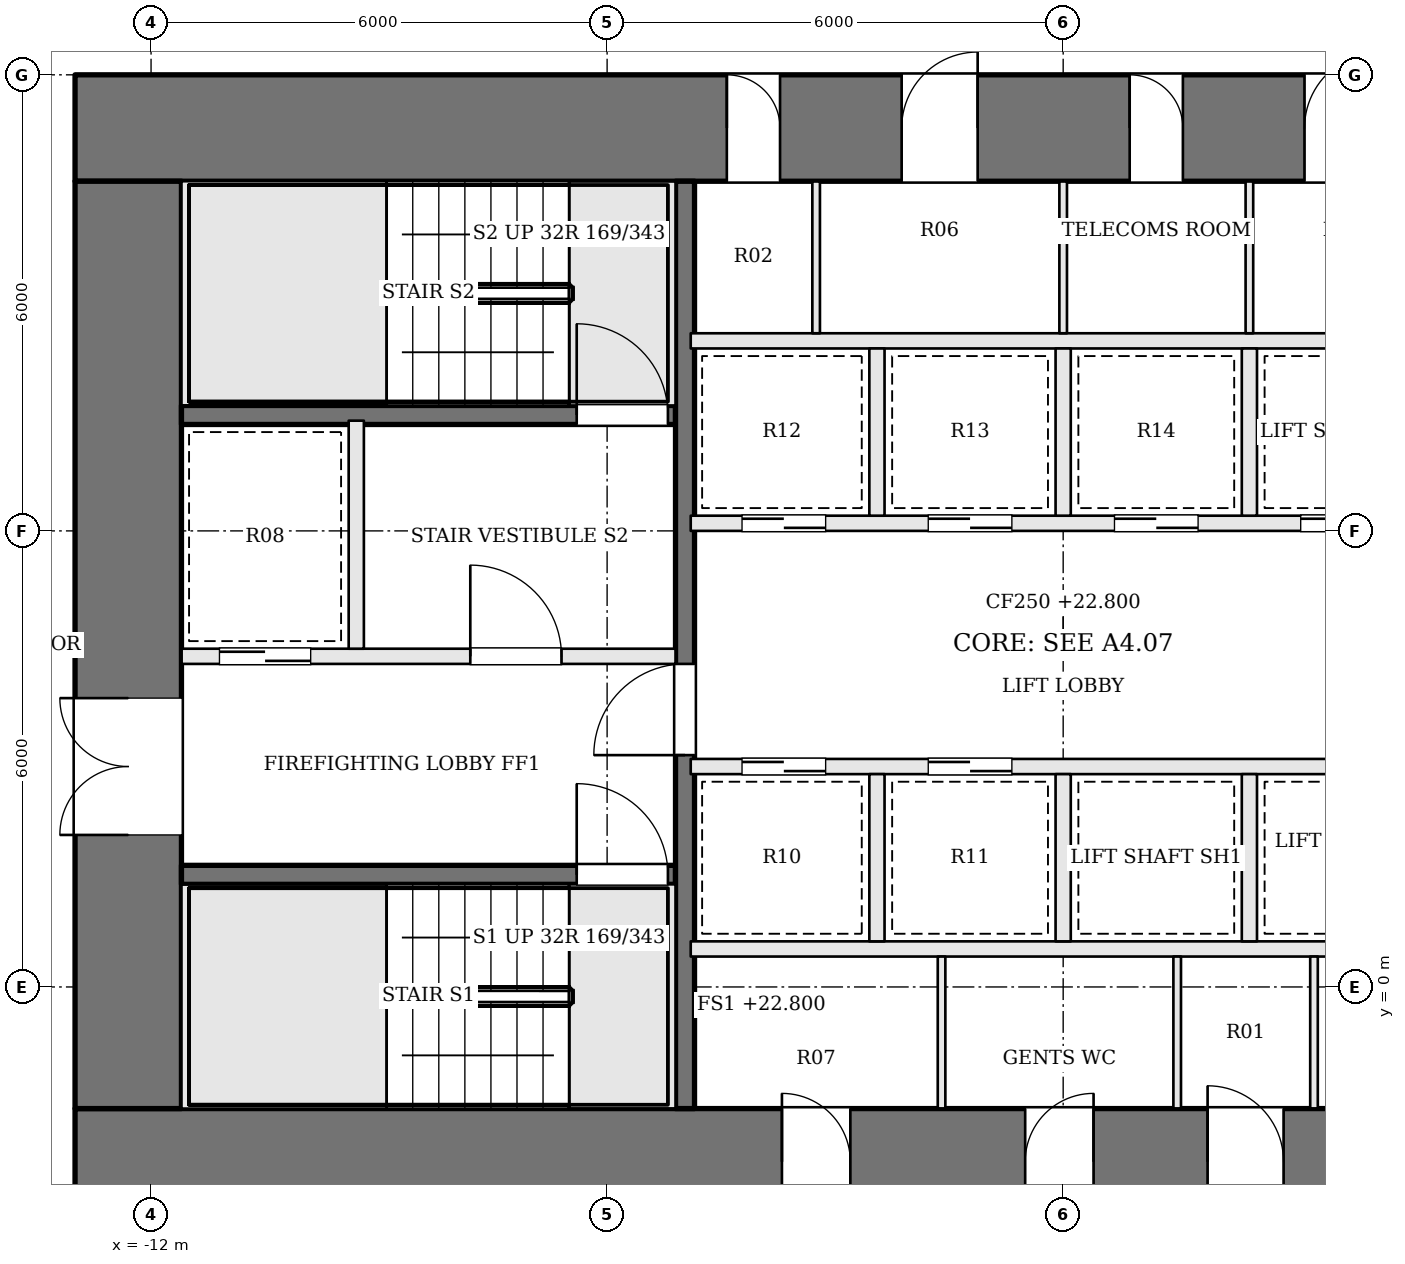
"""IFC4 building model, lengths in metres.
Left out: names, types, materials, properties, quantities, classifications, styles, units other than length and angle.
Written with IfcOpenShell. Run it as: python <this file> out.ifc"""

import sys

from ifc_helpers import new_model, si_unit, direction, frame, frame_2d, origin, place, context, subcontext, project, spatial, rectangle, extrude, element, fill, save


model = new_model("IFC4")
c1 = context("Model", 3, precision=1e-05, world=origin(), true_north=direction((0.0, 1.0)))
c2 = subcontext(c1, "Body", "Model", "MODEL_VIEW")
j1 = project(units=[si_unit("LENGTHUNIT", "METRE"), si_unit("PLANEANGLEUNIT", "RADIAN")], contexts=[c1])
p1 = place(None, origin())
s1 = spatial("IfcSite", under=j1, at=p1, CompositionType="ELEMENT")
p2 = place(p1, origin())
s2 = spatial("IfcBuilding", under=s1, at=p2, CompositionType="ELEMENT")
p3 = place(p2, frame((0.0, 0.0, 22.8)))
s3 = spatial("IfcBuildingStorey", under=s2, at=p3, CompositionType="ELEMENT", Elevation=22.8)
p4 = place(p3, frame((-13.0, 11.3, 0.0), z_axis=(0.0, 0.0, 1.0), x_axis=(1.0, 0.0, 0.0)))
e1 = element("IfcWall", 1, at=p4, inside=s3, PredefinedType="SHEAR", context=c2, shape_type="SweptSolid", body=[
    extrude(rectangle(XDim=26.0, YDim=1.4, at=frame_2d((13.0, 0.0))), origin(), (0.0, 0.0, 1.0), 5.4),
])
p5 = place(p4, frame((8.575, 0.0, 0.0)))
e2 = element("IfcOpeningElement", 2, at=p5, cuts=e1, PredefinedType="OPENING", context=c2, shape_type="SweptSolid", body=[
    extrude(rectangle(XDim=0.7, YDim=2.1, at=frame_2d((0.35, 1.05))), frame((0.0, 0.71, 0.0), z_axis=(0.0, -1.0, 0.0), x_axis=(1.0, 0.0, 0.0)), (0.0, 0.0, 1.0), 1.42),
])
p6 = place(p4, frame((10.875, 0.0, 0.0)))
e3 = element("IfcOpeningElement", 3, at=p6, cuts=e1, PredefinedType="OPENING", context=c2, shape_type="SweptSolid", body=[
    extrude(rectangle(XDim=1.0, YDim=2.1, at=frame_2d((0.5, 1.05))), frame((0.0, 0.71, 0.0), z_axis=(0.0, -1.0, 0.0), x_axis=(1.0, 0.0, 0.0)), (0.0, 0.0, 1.0), 1.42),
])
p7 = place(p4, frame((13.875, 0.0, 0.0)))
e4 = element("IfcOpeningElement", 4, at=p7, cuts=e1, PredefinedType="OPENING", context=c2, shape_type="SweptSolid", body=[
    extrude(rectangle(XDim=0.7, YDim=2.1, at=frame_2d((0.35, 1.05))), frame((0.0, 0.71, 0.0), z_axis=(0.0, -1.0, 0.0), x_axis=(1.0, 0.0, 0.0)), (0.0, 0.0, 1.0), 1.42),
])
p8 = place(p4, frame((16.175, 0.0, 0.0)))
e5 = element("IfcOpeningElement", 5, at=p8, cuts=e1, PredefinedType="OPENING", context=c2, shape_type="SweptSolid", body=[
    extrude(rectangle(XDim=1.0, YDim=2.1, at=frame_2d((0.5, 1.05))), frame((0.0, 0.71, 0.0), z_axis=(0.0, -1.0, 0.0), x_axis=(1.0, 0.0, 0.0)), (0.0, 0.0, 1.0), 1.42),
])
p9 = place(p3, frame((-13.0, -2.3, 0.0), z_axis=(0.0, 0.0, 1.0), x_axis=(1.0, 0.0, 0.0)))
e6 = element("IfcWall", 6, at=p9, inside=s3, PredefinedType="SHEAR", context=c2, shape_type="SweptSolid", body=[
    extrude(rectangle(XDim=26.0, YDim=1.4, at=frame_2d((13.0, 0.0))), origin(), (0.0, 0.0, 1.0), 5.4),
])
p10 = place(p9, frame((9.3, 0.0, 0.0)))
e7 = element("IfcOpeningElement", 7, at=p10, cuts=e6, PredefinedType="OPENING", context=c2, shape_type="SweptSolid", body=[
    extrude(rectangle(XDim=0.9, YDim=2.1, at=frame_2d((0.45, 1.05))), frame((0.0, 0.71, 0.0), z_axis=(0.0, -1.0, 0.0), x_axis=(1.0, 0.0, 0.0)), (0.0, 0.0, 1.0), 1.42),
])
p11 = place(p9, frame((12.5, 0.0, 0.0)))
e8 = element("IfcOpeningElement", 8, at=p11, cuts=e6, PredefinedType="OPENING", context=c2, shape_type="SweptSolid", body=[
    extrude(rectangle(XDim=0.9, YDim=2.1, at=frame_2d((0.45, 1.05))), frame((0.0, 0.71, 0.0), z_axis=(0.0, -1.0, 0.0), x_axis=(1.0, 0.0, 0.0)), (0.0, 0.0, 1.0), 1.42),
])
p12 = place(p9, frame((14.9, 0.0, 0.0)))
e9 = element("IfcOpeningElement", 9, at=p12, cuts=e6, PredefinedType="OPENING", context=c2, shape_type="SweptSolid", body=[
    extrude(rectangle(XDim=1.0, YDim=2.1, at=frame_2d((0.5, 1.05))), frame((0.0, 0.71, 0.0), z_axis=(0.0, -1.0, 0.0), x_axis=(1.0, 0.0, 0.0)), (0.0, 0.0, 1.0), 1.42),
])
p13 = place(p9, frame((16.6, 0.0, 0.0)))
e10 = element("IfcOpeningElement", 10, at=p13, cuts=e6, PredefinedType="OPENING", context=c2, shape_type="SweptSolid", body=[
    extrude(rectangle(XDim=1.0, YDim=2.1, at=frame_2d((0.5, 1.05))), frame((0.0, 0.71, 0.0), z_axis=(0.0, -1.0, 0.0), x_axis=(1.0, 0.0, 0.0)), (0.0, 0.0, 1.0), 1.42),
])
p14 = place(p3, frame((-12.3, -1.6, 0.0), z_axis=(0.0, 0.0, 1.0), x_axis=(0.0, 1.0, 0.0)))
e11 = element("IfcWall", 11, at=p14, inside=s3, PredefinedType="SHEAR", context=c2, shape_type="SweptSolid", body=[
    extrude(rectangle(XDim=12.2, YDim=1.4, at=frame_2d((6.1, 0.0))), origin(), (0.0, 0.0, 1.0), 5.4),
])
p15 = place(p14, frame((3.6, 0.0, 0.0)))
e12 = element("IfcOpeningElement", 12, at=p15, cuts=e11, PredefinedType="OPENING", context=c2, shape_type="SweptSolid", body=[
    extrude(rectangle(XDim=1.8, YDim=2.1, at=frame_2d((0.9, 1.05))), frame((0.0, 0.71, 0.0), z_axis=(0.0, -1.0, 0.0), x_axis=(1.0, 0.0, 0.0)), (0.0, 0.0, 1.0), 1.42),
])
p16 = place(p3, frame((-11.6, 1.475, 0.0), z_axis=(0.0, 0.0, 1.0), x_axis=(1.0, 0.0, 0.0)))
e13 = element("IfcWall", 13, at=p16, inside=s3, PredefinedType="SOLIDWALL", context=c2, shape_type="SweptSolid", body=[
    extrude(rectangle(XDim=6.5, YDim=0.25, at=frame_2d((3.25, 0.0))), origin(), (0.0, 0.0, 1.0), 5.15),
])
p17 = place(p16, frame((5.2, 0.0, 0.0)))
e14 = element("IfcOpeningElement", 14, at=p17, cuts=e13, PredefinedType="OPENING", context=c2, shape_type="SweptSolid", body=[
    extrude(rectangle(XDim=1.2, YDim=2.1, at=frame_2d((0.6, 1.05))), frame((0.0, 0.135, 0.0), z_axis=(0.0, -1.0, 0.0), x_axis=(1.0, 0.0, 0.0)), (0.0, 0.0, 1.0), 0.27),
])
p18 = place(p3, frame((-11.6, 4.35, 0.0), z_axis=(0.0, 0.0, 1.0), x_axis=(1.0, 0.0, 0.0)))
e15 = element("IfcWall", 15, at=p18, inside=s3, PredefinedType="SOLIDWALL", context=c2, shape_type="SweptSolid", body=[
    extrude(rectangle(XDim=6.5, YDim=0.2, at=frame_2d((3.25, 0.0))), origin(), (0.0, 0.0, 1.0), 5.15),
])
p19 = place(p18, frame((3.8, 0.0, 0.0)))
e16 = element("IfcOpeningElement", 16, at=p19, cuts=e15, PredefinedType="OPENING", context=c2, shape_type="SweptSolid", body=[
    extrude(rectangle(XDim=1.2, YDim=2.1, at=frame_2d((0.6, 1.05))), frame((0.0, 0.11, 0.0), z_axis=(0.0, -1.0, 0.0), x_axis=(1.0, 0.0, 0.0)), (0.0, 0.0, 1.0), 0.22),
])
p20 = place(p18, frame((0.5, 0.0, 0.0)))
e17 = element("IfcOpeningElement", 17, at=p20, cuts=e15, PredefinedType="OPENING", context=c2, shape_type="SweptSolid", body=[
    extrude(rectangle(XDim=1.2, YDim=2.1, at=frame_2d((0.6, 1.05))), frame((0.0, 0.11, 0.0), z_axis=(0.0, -1.0, 0.0), x_axis=(1.0, 0.0, 0.0)), (0.0, 0.0, 1.0), 0.22),
])
p21 = place(p3, frame((-11.6, 7.525, 0.0), z_axis=(0.0, 0.0, 1.0), x_axis=(1.0, 0.0, 0.0)))
e18 = element("IfcWall", 18, at=p21, inside=s3, PredefinedType="SOLIDWALL", context=c2, shape_type="SweptSolid", body=[
    extrude(rectangle(XDim=6.5, YDim=0.25, at=frame_2d((3.25, 0.0))), origin(), (0.0, 0.0, 1.0), 5.15),
])
p22 = place(p21, frame((5.2, 0.0, 0.0)))
e19 = element("IfcOpeningElement", 19, at=p22, cuts=e18, PredefinedType="OPENING", context=c2, shape_type="SweptSolid", body=[
    extrude(rectangle(XDim=1.2, YDim=2.1, at=frame_2d((0.6, 1.05))), frame((0.0, 0.135, 0.0), z_axis=(0.0, -1.0, 0.0), x_axis=(1.0, 0.0, 0.0)), (0.0, 0.0, 1.0), 0.27),
])
p23 = place(p3, frame((-9.3, 4.45, 0.0), z_axis=(0.0, 0.0, 1.0), x_axis=(0.0, 1.0, 0.0)))
e20 = element("IfcWall", 20, at=p23, inside=s3, PredefinedType="SOLIDWALL", context=c2, shape_type="SweptSolid", body=[
    extrude(rectangle(XDim=3.0, YDim=0.2, at=frame_2d((1.5, 0.0))), origin(), (0.0, 0.0, 1.0), 5.15),
])
p24 = place(p3, frame((-4.975, -1.6, 0.0), z_axis=(0.0, 0.0, 1.0), x_axis=(0.0, 1.0, 0.0)))
e21 = element("IfcWall", 21, at=p24, inside=s3, PredefinedType="SOLIDWALL", context=c2, shape_type="SweptSolid", body=[
    extrude(rectangle(XDim=12.2, YDim=0.25, at=frame_2d((6.1, 0.0))), origin(), (0.0, 0.0, 1.0), 5.15),
])
p25 = place(p24, frame((4.65, 0.0, 0.0)))
e22 = element("IfcOpeningElement", 22, at=p25, cuts=e21, PredefinedType="OPENING", context=c2, shape_type="SweptSolid", body=[
    extrude(rectangle(XDim=1.2, YDim=2.1, at=frame_2d((0.6, 1.05))), frame((0.0, 0.135, 0.0), z_axis=(0.0, -1.0, 0.0), x_axis=(1.0, 0.0, 0.0)), (0.0, 0.0, 1.0), 0.27),
])
p26 = place(p3, frame((-4.9, 0.5, 0.0), z_axis=(0.0, 0.0, 1.0), x_axis=(1.0, 0.0, 0.0)))
e23 = element("IfcWall", 23, at=p26, inside=s3, PredefinedType="SOLIDWALL", context=c2, shape_type="SweptSolid", body=[
    extrude(rectangle(XDim=9.8, YDim=0.2, at=frame_2d((4.9, 0.0))), origin(), (0.0, 0.0, 1.0), 5.15),
])
p27 = place(p3, frame((-4.9, 2.9, 0.0), z_axis=(0.0, 0.0, 1.0), x_axis=(1.0, 0.0, 0.0)))
e24 = element("IfcWall", 24, at=p27, inside=s3, PredefinedType="SOLIDWALL", context=c2, shape_type="SweptSolid", body=[
    extrude(rectangle(XDim=9.8, YDim=0.2, at=frame_2d((4.9, 0.0))), origin(), (0.0, 0.0, 1.0), 5.15),
])
p28 = place(p27, frame((0.675, 0.0, 0.0)))
e25 = element("IfcOpeningElement", 25, at=p28, cuts=e24, PredefinedType="OPENING", context=c2, shape_type="SweptSolid", body=[
    extrude(rectangle(XDim=1.1, YDim=2.1, at=frame_2d((0.55, 1.05))), frame((0.0, 0.11, 0.0), z_axis=(0.0, -1.0, 0.0), x_axis=(1.0, 0.0, 0.0)), (0.0, 0.0, 1.0), 0.22),
])
p29 = place(p27, frame((3.125, 0.0, 0.0)))
e26 = element("IfcOpeningElement", 26, at=p29, cuts=e24, PredefinedType="OPENING", context=c2, shape_type="SweptSolid", body=[
    extrude(rectangle(XDim=1.1, YDim=2.1, at=frame_2d((0.55, 1.05))), frame((0.0, 0.11, 0.0), z_axis=(0.0, -1.0, 0.0), x_axis=(1.0, 0.0, 0.0)), (0.0, 0.0, 1.0), 0.22),
])
p30 = place(p3, frame((-4.9, 6.1, 0.0), z_axis=(0.0, 0.0, 1.0), x_axis=(1.0, 0.0, 0.0)))
e27 = element("IfcWall", 27, at=p30, inside=s3, PredefinedType="SOLIDWALL", context=c2, shape_type="SweptSolid", body=[
    extrude(rectangle(XDim=9.8, YDim=0.2, at=frame_2d((4.9, 0.0))), origin(), (0.0, 0.0, 1.0), 5.15),
])
p31 = place(p30, frame((0.675, 0.0, 0.0)))
e28 = element("IfcOpeningElement", 28, at=p31, cuts=e27, PredefinedType="OPENING", context=c2, shape_type="SweptSolid", body=[
    extrude(rectangle(XDim=1.1, YDim=2.1, at=frame_2d((0.55, 1.05))), frame((0.0, 0.11, 0.0), z_axis=(0.0, -1.0, 0.0), x_axis=(1.0, 0.0, 0.0)), (0.0, 0.0, 1.0), 0.22),
])
p32 = place(p30, frame((3.125, 0.0, 0.0)))
e29 = element("IfcOpeningElement", 29, at=p32, cuts=e27, PredefinedType="OPENING", context=c2, shape_type="SweptSolid", body=[
    extrude(rectangle(XDim=1.1, YDim=2.1, at=frame_2d((0.55, 1.05))), frame((0.0, 0.11, 0.0), z_axis=(0.0, -1.0, 0.0), x_axis=(1.0, 0.0, 0.0)), (0.0, 0.0, 1.0), 0.22),
])
p33 = place(p30, frame((5.575, 0.0, 0.0)))
e30 = element("IfcOpeningElement", 30, at=p33, cuts=e27, PredefinedType="OPENING", context=c2, shape_type="SweptSolid", body=[
    extrude(rectangle(XDim=1.1, YDim=2.1, at=frame_2d((0.55, 1.05))), frame((0.0, 0.11, 0.0), z_axis=(0.0, -1.0, 0.0), x_axis=(1.0, 0.0, 0.0)), (0.0, 0.0, 1.0), 0.22),
])
p34 = place(p30, frame((8.025, 0.0, 0.0)))
e31 = element("IfcOpeningElement", 31, at=p34, cuts=e27, PredefinedType="OPENING", context=c2, shape_type="SweptSolid", body=[
    extrude(rectangle(XDim=1.1, YDim=2.1, at=frame_2d((0.55, 1.05))), frame((0.0, 0.11, 0.0), z_axis=(0.0, -1.0, 0.0), x_axis=(1.0, 0.0, 0.0)), (0.0, 0.0, 1.0), 0.22),
])
p35 = place(p3, frame((-4.9, 8.5, 0.0), z_axis=(0.0, 0.0, 1.0), x_axis=(1.0, 0.0, 0.0)))
e32 = element("IfcWall", 32, at=p35, inside=s3, PredefinedType="SOLIDWALL", context=c2, shape_type="SweptSolid", body=[
    extrude(rectangle(XDim=9.8, YDim=0.2, at=frame_2d((4.9, 0.0))), origin(), (0.0, 0.0, 1.0), 5.15),
])
for number, where, z_axis, x_axis in (
    (33, (-2.45, 0.6, 0.0), (0.0, 0.0, 1.0), (0.0, 1.0, 0.0)),
    (34, (0.0, 0.6, 0.0), (0.0, 0.0, 1.0), (0.0, 1.0, 0.0)),
    (35, (2.45, 0.6, 0.0), (0.0, 0.0, 1.0), (0.0, 1.0, 0.0)),
    (36, (-2.45, 6.2, 0.0), (0.0, 0.0, 1.0), (0.0, 1.0, 0.0)),
    (37, (0.0, 6.2, 0.0), (0.0, 0.0, 1.0), (0.0, 1.0, 0.0)),
    (38, (2.45, 6.2, 0.0), (0.0, 0.0, 1.0), (0.0, 1.0, 0.0)),
):
    element("IfcWall", number, at=place(p3, frame(where, z_axis=z_axis, x_axis=x_axis)), inside=s3, PredefinedType="SOLIDWALL", context=c2, shape_type="SweptSolid", body=[
        extrude(rectangle(XDim=2.2, YDim=0.2, at=frame_2d((1.1, 0.0))), origin(), (0.0, 0.0, 1.0), 5.15),
    ])
for number, where, z_axis, x_axis in (
    (39, (-1.6, -1.6, 0.0), (0.0, 0.0, 1.0), (0.0, 1.0, 0.0)),
    (40, (1.5, -1.6, 0.0), (0.0, 0.0, 1.0), (0.0, 1.0, 0.0)),
    (41, (3.3, -1.6, 0.0), (0.0, 0.0, 1.0), (0.0, 1.0, 0.0)),
    (42, (-3.25, 8.6, 0.0), (0.0, 0.0, 1.0), (0.0, 1.0, 0.0)),
    (43, (0.0, 8.6, 0.0), (0.0, 0.0, 1.0), (0.0, 1.0, 0.0)),
    (44, (2.45, 8.6, 0.0), (0.0, 0.0, 1.0), (0.0, 1.0, 0.0)),
):
    element("IfcWall", number, at=place(p3, frame(where, z_axis=z_axis, x_axis=x_axis)), inside=s3, PredefinedType="PARTITIONING", context=c2, shape_type="SweptSolid", body=[
        extrude(rectangle(XDim=2.0, YDim=0.1, at=frame_2d((1.0, 0.0))), origin(), (0.0, 0.0, 1.0), 5.15),
    ])
p36 = place(p15, origin())
e45 = element("IfcDoor", 45, at=p36, inside=s3, OperationType="DOUBLE_DOOR_SINGLE_SWING", PredefinedType="DOOR", context=c2, shape_type="SweptSolid", body=[
    extrude(rectangle(XDim=1.8, YDim=2.1, at=frame_2d((0.9, 1.05))), frame((0.0, 0.025, 0.0), z_axis=(0.0, -1.0, 0.0), x_axis=(1.0, 0.0, 0.0)), (0.0, 0.0, 1.0), 0.05),
])
fill(e12, e45)
p37 = place(p25, origin())
e46 = element("IfcDoor", 46, at=p37, inside=s3, OperationType="SINGLE_SWING_LEFT", PredefinedType="DOOR", context=c2, shape_type="SweptSolid", body=[
    extrude(rectangle(XDim=1.2, YDim=2.1, at=frame_2d((0.6, 1.05))), frame((0.0, 0.025, 0.0), z_axis=(0.0, -1.0, 0.0), x_axis=(1.0, 0.0, 0.0)), (0.0, 0.0, 1.0), 0.05),
])
fill(e22, e46)
p38 = place(p19, origin())
e47 = element("IfcDoor", 47, at=p38, inside=s3, OperationType="SINGLE_SWING_LEFT", PredefinedType="DOOR", context=c2, shape_type="SweptSolid", body=[
    extrude(rectangle(XDim=1.2, YDim=2.1, at=frame_2d((0.6, 1.05))), frame((0.0, 0.025, 0.0), z_axis=(0.0, -1.0, 0.0), x_axis=(1.0, 0.0, 0.0)), (0.0, 0.0, 1.0), 0.05),
])
fill(e16, e47)
p39 = place(p17, origin())
e48 = element("IfcDoor", 48, at=p39, inside=s3, OperationType="SINGLE_SWING_LEFT", PredefinedType="DOOR", context=c2, shape_type="SweptSolid", body=[
    extrude(rectangle(XDim=1.2, YDim=2.1, at=frame_2d((0.6, 1.05))), frame((0.0, 0.025, 0.0), z_axis=(0.0, -1.0, 0.0), x_axis=(1.0, 0.0, 0.0)), (0.0, 0.0, 1.0), 0.05),
])
fill(e14, e48)
p40 = place(p22, origin())
e49 = element("IfcDoor", 49, at=p40, inside=s3, OperationType="SINGLE_SWING_LEFT", PredefinedType="DOOR", context=c2, shape_type="SweptSolid", body=[
    extrude(rectangle(XDim=1.2, YDim=2.1, at=frame_2d((0.6, 1.05))), frame((0.0, 0.025, 0.0), z_axis=(0.0, -1.0, 0.0), x_axis=(1.0, 0.0, 0.0)), (0.0, 0.0, 1.0), 0.05),
])
fill(e19, e49)
p41 = place(p20, origin())
e50 = element("IfcDoor", 50, at=p41, inside=s3, OperationType="SLIDING_TO_RIGHT", PredefinedType="DOOR", context=c2, shape_type="SweptSolid", body=[
    extrude(rectangle(XDim=1.2, YDim=2.1, at=frame_2d((0.6, 1.05))), frame((0.0, 0.025, 0.0), z_axis=(0.0, -1.0, 0.0), x_axis=(1.0, 0.0, 0.0)), (0.0, 0.0, 1.0), 0.05),
])
fill(e17, e50)
p42 = place(p28, origin())
e51 = element("IfcDoor", 51, at=p42, inside=s3, OperationType="SLIDING_TO_RIGHT", PredefinedType="DOOR", context=c2, shape_type="SweptSolid", body=[
    extrude(rectangle(XDim=1.1, YDim=2.1, at=frame_2d((0.55, 1.05))), frame((0.0, 0.025, 0.0), z_axis=(0.0, -1.0, 0.0), x_axis=(1.0, 0.0, 0.0)), (0.0, 0.0, 1.0), 0.05),
])
fill(e25, e51)
p43 = place(p29, origin())
e52 = element("IfcDoor", 52, at=p43, inside=s3, OperationType="SLIDING_TO_LEFT", PredefinedType="DOOR", context=c2, shape_type="SweptSolid", body=[
    extrude(rectangle(XDim=1.1, YDim=2.1, at=frame_2d((0.55, 1.05))), frame((0.0, 0.025, 0.0), z_axis=(0.0, -1.0, 0.0), x_axis=(1.0, 0.0, 0.0)), (0.0, 0.0, 1.0), 0.05),
])
fill(e26, e52)
p44 = place(p31, origin())
e53 = element("IfcDoor", 53, at=p44, inside=s3, OperationType="SLIDING_TO_RIGHT", PredefinedType="DOOR", context=c2, shape_type="SweptSolid", body=[
    extrude(rectangle(XDim=1.1, YDim=2.1, at=frame_2d((0.55, 1.05))), frame((0.0, 0.025, 0.0), z_axis=(0.0, -1.0, 0.0), x_axis=(1.0, 0.0, 0.0)), (0.0, 0.0, 1.0), 0.05),
])
fill(e28, e53)
p45 = place(p32, origin())
e54 = element("IfcDoor", 54, at=p45, inside=s3, OperationType="SLIDING_TO_LEFT", PredefinedType="DOOR", context=c2, shape_type="SweptSolid", body=[
    extrude(rectangle(XDim=1.1, YDim=2.1, at=frame_2d((0.55, 1.05))), frame((0.0, 0.025, 0.0), z_axis=(0.0, -1.0, 0.0), x_axis=(1.0, 0.0, 0.0)), (0.0, 0.0, 1.0), 0.05),
])
fill(e29, e54)
p46 = place(p33, origin())
e55 = element("IfcDoor", 55, at=p46, inside=s3, OperationType="SLIDING_TO_RIGHT", PredefinedType="DOOR", context=c2, shape_type="SweptSolid", body=[
    extrude(rectangle(XDim=1.1, YDim=2.1, at=frame_2d((0.55, 1.05))), frame((0.0, 0.025, 0.0), z_axis=(0.0, -1.0, 0.0), x_axis=(1.0, 0.0, 0.0)), (0.0, 0.0, 1.0), 0.05),
])
fill(e30, e55)
p47 = place(p34, origin())
e56 = element("IfcDoor", 56, at=p47, inside=s3, OperationType="SLIDING_TO_LEFT", PredefinedType="DOOR", context=c2, shape_type="SweptSolid", body=[
    extrude(rectangle(XDim=1.1, YDim=2.1, at=frame_2d((0.55, 1.05))), frame((0.0, 0.025, 0.0), z_axis=(0.0, -1.0, 0.0), x_axis=(1.0, 0.0, 0.0)), (0.0, 0.0, 1.0), 0.05),
])
fill(e31, e56)
p48 = place(p10, origin())
e57 = element("IfcDoor", 57, at=p48, inside=s3, OperationType="SINGLE_SWING_LEFT", PredefinedType="DOOR", context=c2, shape_type="SweptSolid", body=[
    extrude(rectangle(XDim=0.9, YDim=2.1, at=frame_2d((0.45, 1.05))), frame((0.0, 0.025, 0.0), z_axis=(0.0, -1.0, 0.0), x_axis=(1.0, 0.0, 0.0)), (0.0, 0.0, 1.0), 0.05),
])
fill(e7, e57)
p49 = place(p11, origin())
e58 = element("IfcDoor", 58, at=p49, inside=s3, OperationType="SINGLE_SWING_RIGHT", PredefinedType="DOOR", context=c2, shape_type="SweptSolid", body=[
    extrude(rectangle(XDim=0.9, YDim=2.1, at=frame_2d((0.45, 1.05))), frame((0.0, 0.025, 0.0), z_axis=(0.0, -1.0, 0.0), x_axis=(1.0, 0.0, 0.0)), (0.0, 0.0, 1.0), 0.05),
])
fill(e8, e58)
p50 = place(p12, origin())
e59 = element("IfcDoor", 59, at=p50, inside=s3, OperationType="SINGLE_SWING_LEFT", PredefinedType="DOOR", context=c2, shape_type="SweptSolid", body=[
    extrude(rectangle(XDim=1.0, YDim=2.1, at=frame_2d((0.5, 1.05))), frame((0.0, 0.025, 0.0), z_axis=(0.0, -1.0, 0.0), x_axis=(1.0, 0.0, 0.0)), (0.0, 0.0, 1.0), 0.05),
])
fill(e9, e59)
p51 = place(p5, origin())
e60 = element("IfcDoor", 60, at=p51, inside=s3, OperationType="SINGLE_SWING_LEFT", PredefinedType="DOOR", context=c2, shape_type="SweptSolid", body=[
    extrude(rectangle(XDim=0.7, YDim=2.1, at=frame_2d((0.35, 1.05))), frame((0.0, 0.025, 0.0), z_axis=(0.0, -1.0, 0.0), x_axis=(1.0, 0.0, 0.0)), (0.0, 0.0, 1.0), 0.05),
])
fill(e2, e60)
p52 = place(p6, origin())
e61 = element("IfcDoor", 61, at=p52, inside=s3, OperationType="SINGLE_SWING_RIGHT", PredefinedType="DOOR", context=c2, shape_type="SweptSolid", body=[
    extrude(rectangle(XDim=1.0, YDim=2.1, at=frame_2d((0.5, 1.05))), frame((0.0, 0.025, 0.0), z_axis=(0.0, -1.0, 0.0), x_axis=(1.0, 0.0, 0.0)), (0.0, 0.0, 1.0), 0.05),
])
fill(e3, e61)
p53 = place(p7, origin())
e62 = element("IfcDoor", 62, at=p53, inside=s3, OperationType="SINGLE_SWING_LEFT", PredefinedType="DOOR", context=c2, shape_type="SweptSolid", body=[
    extrude(rectangle(XDim=0.7, YDim=2.1, at=frame_2d((0.35, 1.05))), frame((0.0, 0.025, 0.0), z_axis=(0.0, -1.0, 0.0), x_axis=(1.0, 0.0, 0.0)), (0.0, 0.0, 1.0), 0.05),
])
fill(e4, e62)
p54 = place(p8, origin())
e63 = element("IfcDoor", 63, at=p54, inside=s3, OperationType="SINGLE_SWING_RIGHT", PredefinedType="DOOR", context=c2, shape_type="SweptSolid", body=[
    extrude(rectangle(XDim=1.0, YDim=2.1, at=frame_2d((0.5, 1.05))), frame((0.0, 0.025, 0.0), z_axis=(0.0, -1.0, 0.0), x_axis=(1.0, 0.0, 0.0)), (0.0, 0.0, 1.0), 0.05),
])
fill(e5, e63)
save(model, sys.argv[1])
